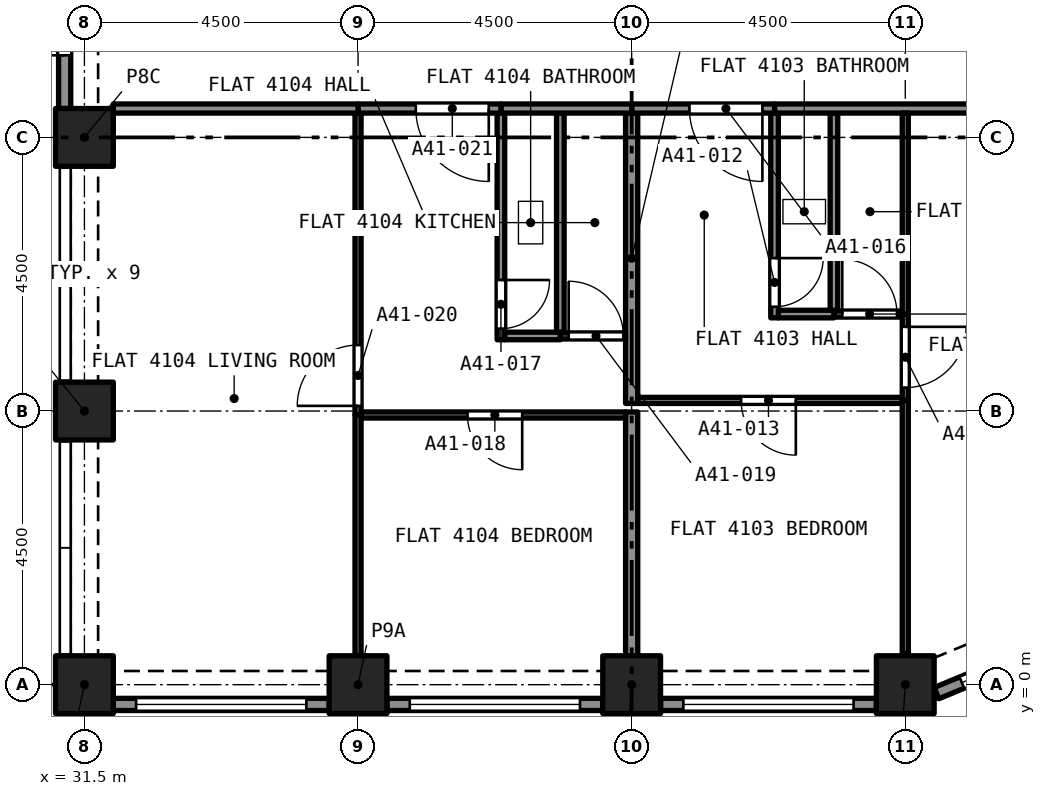
"""IFC4 building model, lengths in metres.
Left out: names, types, materials, properties, quantities, classifications, styles, units other than length and angle.
Written with IfcOpenShell. Run it as: python <this file> out.ifc"""

import sys

from ifc_helpers import new_model, si_unit, direction, frame, frame_2d, origin, origin_2d, place, context, subcontext, project, spatial, rectangle, extrude, element, fill, save


model = new_model("IFC4")
c1 = context("Model", 3, precision=1e-05, world=origin(), true_north=direction((0.0, 1.0)))
c2 = subcontext(c1, "Body", "Model", "MODEL_VIEW")
j1 = project(units=[si_unit("LENGTHUNIT", "METRE"), si_unit("PLANEANGLEUNIT", "RADIAN")], contexts=[c1])
p1 = place(None, origin())
s1 = spatial("IfcSite", under=j1, at=p1, CompositionType="ELEMENT")
p2 = place(p1, origin())
s2 = spatial("IfcBuilding", under=s1, at=p2, CompositionType="ELEMENT")
p3 = place(p2, frame((0.0, 0.0, 146.2)))
s3 = spatial("IfcBuildingStorey", under=s2, at=p3, CompositionType="ELEMENT", Elevation=146.2)
for number, where, z_axis, x_axis in (
    (1, (31.5, 0.0, 0.0), (0.0, 0.0, 1.0), (1.0, 0.0, 0.0)),
    (2, (36.0, 0.0, 0.0), (0.0, 0.0, 1.0), (1.0, 0.0, 0.0)),
    (3, (40.5, 0.0, 0.0), (0.0, 0.0, 1.0), (1.0, 0.0, 0.0)),
    (4, (45.0, 0.0, 0.0), (0.0, 0.0, 1.0), (1.0, 0.0, 0.0)),
    (5, (31.5, 4.5, 0.0), (0.0, 0.0, 1.0), (1.0, 0.0, 0.0)),
    (6, (31.5, 9.0, 0.0), (0.0, 0.0, 1.0), (1.0, 0.0, 0.0)),
):
    element("IfcColumn", number, at=place(p3, frame(where, z_axis=z_axis, x_axis=x_axis)), inside=s3, PredefinedType="COLUMN", context=c2, shape_type="SweptSolid", body=[
        extrude(rectangle(XDim=0.95, YDim=0.95, at=origin_2d()), origin(), (0.0, 0.0, 1.0), 4.4),
    ])
p4 = place(p3, frame((35.525, -0.325, 0.0), z_axis=(0.0, 0.0, 1.0), x_axis=(-1.0, 0.0, 0.0)))
e7 = element("IfcWall", 7, at=p4, inside=s3, PredefinedType="SOLIDWALL", context=c2, shape_type="SweptSolid", body=[
    extrude(rectangle(XDim=3.55, YDim=0.2, at=frame_2d((1.775, 0.0))), origin(), (0.0, 0.0, 1.0), 4.4),
])
p5 = place(p4, frame((0.375, 0.0, 0.45)))
e8 = element("IfcOpeningElement", 8, at=p5, cuts=e7, PredefinedType="OPENING", context=c2, shape_type="SweptSolid", body=[
    extrude(rectangle(XDim=2.8, YDim=2.55, at=frame_2d((1.4, 1.275))), frame((0.0, 0.11, 0.0), z_axis=(0.0, -1.0, 0.0), x_axis=(1.0, 0.0, 0.0)), (0.0, 0.0, 1.0), 0.22),
])
p6 = place(p3, frame((40.025, -0.325, 0.0), z_axis=(0.0, 0.0, 1.0), x_axis=(-1.0, 0.0, 0.0)))
e9 = element("IfcWall", 9, at=p6, inside=s3, PredefinedType="SOLIDWALL", context=c2, shape_type="SweptSolid", body=[
    extrude(rectangle(XDim=3.55, YDim=0.2, at=frame_2d((1.775, 0.0))), origin(), (0.0, 0.0, 1.0), 4.4),
])
p7 = place(p6, frame((0.375, 0.0, 0.45)))
e10 = element("IfcOpeningElement", 10, at=p7, cuts=e9, PredefinedType="OPENING", context=c2, shape_type="SweptSolid", body=[
    extrude(rectangle(XDim=2.8, YDim=2.55, at=frame_2d((1.4, 1.275))), frame((0.0, 0.11, 0.0), z_axis=(0.0, -1.0, 0.0), x_axis=(1.0, 0.0, 0.0)), (0.0, 0.0, 1.0), 0.22),
])
p8 = place(p3, frame((44.525, -0.325, 0.0), z_axis=(0.0, 0.0, 1.0), x_axis=(-1.0, 0.0, 0.0)))
e11 = element("IfcWall", 11, at=p8, inside=s3, PredefinedType="SOLIDWALL", context=c2, shape_type="SweptSolid", body=[
    extrude(rectangle(XDim=3.55, YDim=0.2, at=frame_2d((1.775, 0.0))), origin(), (0.0, 0.0, 1.0), 4.4),
])
p9 = place(p8, frame((0.375, 0.0, 0.45)))
e12 = element("IfcOpeningElement", 12, at=p9, cuts=e11, PredefinedType="OPENING", context=c2, shape_type="SweptSolid", body=[
    extrude(rectangle(XDim=2.8, YDim=2.55, at=frame_2d((1.4, 1.275))), frame((0.0, 0.11, 0.0), z_axis=(0.0, -1.0, 0.0), x_axis=(1.0, 0.0, 0.0)), (0.0, 0.0, 1.0), 0.22),
])
p10 = place(p3, frame((47.733, 0.78, 0.0), z_axis=(0.0, 0.0, 1.0), x_axis=(-0.923880599843, -0.382680855588, 0.0)))
e13 = element("IfcWall", 13, at=p10, inside=s3, PredefinedType="SOLIDWALL", context=c2, shape_type="SweptSolid", body=[
    extrude(rectangle(XDim=2.403, YDim=0.2, at=frame_2d((1.201, 0.0))), origin(), (0.0, 0.0, 1.0), 4.4),
])
p11 = place(p10, frame((0.251, 0.0, 0.45)))
e14 = element("IfcOpeningElement", 14, at=p11, cuts=e13, PredefinedType="OPENING", context=c2, shape_type="SweptSolid", body=[
    extrude(rectangle(XDim=1.7, YDim=2.55, at=frame_2d((0.85, 1.275))), frame((0.0, 0.11, 0.0), z_axis=(0.0, -1.0, 0.0), x_axis=(1.0, 0.0, 0.0)), (0.0, 0.0, 1.0), 0.22),
])
p12 = place(p3, frame((31.175, 9.475, 0.0), z_axis=(0.0, 0.0, 1.0), x_axis=(0.0, 1.0, 0.0)))
e15 = element("IfcWall", 15, at=p12, inside=s3, PredefinedType="SOLIDWALL", context=c2, shape_type="SweptSolid", body=[
    extrude(rectangle(XDim=3.55, YDim=0.2, at=frame_2d((1.775, 0.0))), origin(), (0.0, 0.0, 1.0), 4.4),
])
p13 = place(p12, frame((0.875, 0.0, 0.0)))
e16 = element("IfcOpeningElement", 16, at=p13, cuts=e15, PredefinedType="OPENING", context=c2, shape_type="SweptSolid", body=[
    extrude(rectangle(XDim=1.8, YDim=2.4, at=frame_2d((0.9, 1.2))), frame((0.0, 0.11, 0.0), z_axis=(0.0, -1.0, 0.0), x_axis=(1.0, 0.0, 0.0)), (0.0, 0.0, 1.0), 0.22),
])
p14 = place(p3, frame((42.913, 6.095, 0.0), z_axis=(0.0, 0.0, 1.0), x_axis=(1.0, 0.0, 0.0)))
e17 = element("IfcWall", 17, at=p14, inside=s3, PredefinedType="PARTITIONING", context=c2, shape_type="SweptSolid", body=[
    extrude(rectangle(XDim=0.915, YDim=0.125, at=frame_2d((0.458, 0.0))), origin(), (0.0, 0.0, 1.0), 4.1),
])
p15 = place(p3, frame((42.85, 9.4, 0.0), z_axis=(0.0, 0.0, 1.0), x_axis=(0.0, -1.0, 0.0)))
e18 = element("IfcWall", 18, at=p15, inside=s3, PredefinedType="PARTITIONING", context=c2, shape_type="SweptSolid", body=[
    extrude(rectangle(XDim=3.367, YDim=0.125, at=frame_2d((1.684, 0.0))), origin(), (0.0, 0.0, 1.0), 4.1),
])
p16 = place(p15, frame((2.385, 0.0, 0.0)))
e19 = element("IfcOpeningElement", 19, at=p16, cuts=e18, PredefinedType="OPENING", context=c2, shape_type="SweptSolid", body=[
    extrude(rectangle(XDim=0.8, YDim=2.1, at=frame_2d((0.4, 1.05))), frame((0.0, 0.073, 0.0), z_axis=(0.0, -1.0, 0.0), x_axis=(1.0, 0.0, 0.0)), (0.0, 0.0, 1.0), 0.145),
])
p17 = place(p3, frame((43.827, 6.157, 0.0), z_axis=(0.0, 0.0, 1.0), x_axis=(0.0, 1.0, 0.0)))
e20 = element("IfcWall", 20, at=p17, inside=s3, PredefinedType="PARTITIONING", context=c2, shape_type="SweptSolid", body=[
    extrude(rectangle(XDim=3.242, YDim=0.125, at=frame_2d((1.621, 0.0))), origin(), (0.0, 0.0, 1.0), 4.1),
])
p18 = place(p3, frame((42.85, 9.475, 0.0), z_axis=(0.0, 0.0, 1.0), x_axis=(1.0, 0.0, 0.0)))
e21 = element("IfcWall", 21, at=p18, inside=s3, PredefinedType="PARTITIONING", context=c2, shape_type="SweptSolid", body=[
    extrude(rectangle(XDim=6.175, YDim=0.15, at=frame_2d((3.087, 0.0))), origin(), (0.0, 0.0, 1.0), 4.1),
])
p19 = place(p3, frame((44.95, 4.675, 0.0), z_axis=(0.0, 0.0, 1.0), x_axis=(-1.0, 0.0, 0.0)))
e22 = element("IfcWall", 22, at=p19, inside=s3, PredefinedType="PARTITIONING", context=c2, shape_type="SweptSolid", body=[
    extrude(rectangle(XDim=4.35, YDim=0.1, at=frame_2d((2.175, 0.0))), origin(), (0.0, 0.0, 1.0), 4.1),
])
p20 = place(p19, frame((1.75, 0.0, 0.0)))
e23 = element("IfcOpeningElement", 23, at=p20, cuts=e22, PredefinedType="OPENING", context=c2, shape_type="SweptSolid", body=[
    extrude(rectangle(XDim=0.9, YDim=2.1, at=frame_2d((0.45, 1.05))), frame((0.0, 0.06, 0.0), z_axis=(0.0, -1.0, 0.0), x_axis=(1.0, 0.0, 0.0)), (0.0, 0.0, 1.0), 0.12),
])
p21 = place(p3, frame((45.0, 0.514, 0.0), z_axis=(0.0, 0.0, 1.0), x_axis=(0.0, 1.0, 0.0)))
e24 = element("IfcWall", 24, at=p21, inside=s3, PredefinedType="PARTITIONING", context=c2, shape_type="SweptSolid", body=[
    extrude(rectangle(XDim=4.161, YDim=0.1, at=frame_2d((2.081, 0.0))), origin(), (0.0, 0.0, 1.0), 4.1),
])
p22 = place(p3, frame((40.5, 0.475, 0.0), z_axis=(0.0, 0.0, 1.0), x_axis=(0.0, 1.0, 0.0)))
e25 = element("IfcWall", 25, at=p22, inside=s3, PredefinedType="PARTITIONING", context=c2, shape_type="SweptSolid", body=[
    extrude(rectangle(XDim=4.01, YDim=0.2, at=frame_2d((2.005, 0.0))), origin(), (0.0, 0.0, 1.0), 4.1),
])
p23 = place(p3, frame((43.827, 6.095, 0.0), z_axis=(0.0, 0.0, 1.0), x_axis=(1.0, 0.0, 0.0)))
e26 = element("IfcWall", 26, at=p23, inside=s3, PredefinedType="PARTITIONING", context=c2, shape_type="SweptSolid", body=[
    extrude(rectangle(XDim=1.123, YDim=0.1, at=frame_2d((0.561, 0.0))), origin(), (0.0, 0.0, 1.0), 4.1),
])
p24 = place(p23, frame((0.136, 0.0, 0.0)))
e27 = element("IfcOpeningElement", 27, at=p24, cuts=e26, PredefinedType="OPENING", context=c2, shape_type="SweptSolid", body=[
    extrude(rectangle(XDim=0.9, YDim=2.1, at=frame_2d((0.45, 1.05))), frame((0.0, 0.06, 0.0), z_axis=(0.0, -1.0, 0.0), x_axis=(1.0, 0.0, 0.0)), (0.0, 0.0, 1.0), 0.12),
])
p25 = place(p3, frame((45.0, 6.095, 0.0), z_axis=(0.0, 0.0, 1.0), x_axis=(0.0, -1.0, 0.0)))
e28 = element("IfcWall", 28, at=p25, inside=s3, PredefinedType="PARTITIONING", context=c2, shape_type="SweptSolid", body=[
    extrude(rectangle(XDim=1.42, YDim=0.1, at=frame_2d((0.71, 0.0))), origin(), (0.0, 0.0, 1.0), 4.1),
])
p26 = place(p25, frame((0.21, 0.0, 0.0)))
e29 = element("IfcOpeningElement", 29, at=p26, cuts=e28, PredefinedType="OPENING", context=c2, shape_type="SweptSolid", body=[
    extrude(rectangle(XDim=1.0, YDim=2.1, at=frame_2d((0.5, 1.05))), frame((0.0, 0.06, 0.0), z_axis=(0.0, -1.0, 0.0), x_axis=(1.0, 0.0, 0.0)), (0.0, 0.0, 1.0), 0.12),
])
p27 = place(p3, frame((40.5, 4.625, 0.0), z_axis=(0.0, 0.0, 1.0), x_axis=(0.0, 1.0, 0.0)))
e30 = element("IfcWall", 30, at=p27, inside=s3, PredefinedType="PARTITIONING", context=c2, shape_type="SweptSolid", body=[
    extrude(rectangle(XDim=4.775, YDim=0.2, at=frame_2d((2.387, 0.0))), origin(), (0.0, 0.0, 1.0), 4.1),
])
p28 = place(p3, frame((42.85, 9.475, 0.0), z_axis=(0.0, 0.0, 1.0), x_axis=(-1.0, 0.0, 0.0)))
e31 = element("IfcWall", 31, at=p28, inside=s3, PredefinedType="PARTITIONING", context=c2, shape_type="SweptSolid", body=[
    extrude(rectangle(XDim=2.35, YDim=0.15, at=frame_2d((1.175, 0.0))), origin(), (0.0, 0.0, 1.0), 4.1),
])
p29 = place(p28, frame((0.2, 0.0, 0.0)))
e32 = element("IfcOpeningElement", 32, at=p29, cuts=e31, PredefinedType="OPENING", context=c2, shape_type="SweptSolid", body=[
    extrude(rectangle(XDim=1.2, YDim=2.4, at=frame_2d((0.6, 1.2))), frame((0.0, 0.085, 0.0), z_axis=(0.0, -1.0, 0.0), x_axis=(1.0, 0.0, 0.0)), (0.0, 0.0, 1.0), 0.17),
])
p30 = place(p3, frame((45.0, 6.095, 0.0), z_axis=(0.0, 0.0, 1.0), x_axis=(0.0, 1.0, 0.0)))
e33 = element("IfcWall", 33, at=p30, inside=s3, PredefinedType="PARTITIONING", context=c2, shape_type="SweptSolid", body=[
    extrude(rectangle(XDim=3.305, YDim=0.1, at=frame_2d((1.652, 0.0))), origin(), (0.0, 0.0, 1.0), 4.1),
])
p31 = place(p3, frame((38.413, 5.735, 0.0), z_axis=(0.0, 0.0, 1.0), x_axis=(1.0, 0.0, 0.0)))
e34 = element("IfcWall", 34, at=p31, inside=s3, PredefinedType="PARTITIONING", context=c2, shape_type="SweptSolid", body=[
    extrude(rectangle(XDim=0.915, YDim=0.125, at=frame_2d((0.458, 0.0))), origin(), (0.0, 0.0, 1.0), 4.1),
])
p32 = place(p3, frame((38.35, 9.4, 0.0), z_axis=(0.0, 0.0, 1.0), x_axis=(0.0, -1.0, 0.0)))
e35 = element("IfcWall", 35, at=p32, inside=s3, PredefinedType="PARTITIONING", context=c2, shape_type="SweptSolid", body=[
    extrude(rectangle(XDim=3.727, YDim=0.125, at=frame_2d((1.864, 0.0))), origin(), (0.0, 0.0, 1.0), 4.1),
])
p33 = place(p32, frame((2.745, 0.0, 0.0)))
e36 = element("IfcOpeningElement", 36, at=p33, cuts=e35, PredefinedType="OPENING", context=c2, shape_type="SweptSolid", body=[
    extrude(rectangle(XDim=0.8, YDim=2.1, at=frame_2d((0.4, 1.05))), frame((0.0, 0.073, 0.0), z_axis=(0.0, -1.0, 0.0), x_axis=(1.0, 0.0, 0.0)), (0.0, 0.0, 1.0), 0.145),
])
p34 = place(p3, frame((39.327, 5.798, 0.0), z_axis=(0.0, 0.0, 1.0), x_axis=(0.0, 1.0, 0.0)))
e37 = element("IfcWall", 37, at=p34, inside=s3, PredefinedType="PARTITIONING", context=c2, shape_type="SweptSolid", body=[
    extrude(rectangle(XDim=3.602, YDim=0.125, at=frame_2d((1.801, 0.0))), origin(), (0.0, 0.0, 1.0), 4.1),
])
p35 = place(p3, frame((38.35, 9.475, 0.0), z_axis=(0.0, 0.0, 1.0), x_axis=(1.0, 0.0, 0.0)))
e38 = element("IfcWall", 38, at=p35, inside=s3, PredefinedType="PARTITIONING", context=c2, shape_type="SweptSolid", body=[
    extrude(rectangle(XDim=2.15, YDim=0.15, at=frame_2d((1.075, 0.0))), origin(), (0.0, 0.0, 1.0), 4.1),
])
p36 = place(p3, frame((40.4, 4.435, 0.0), z_axis=(0.0, 0.0, 1.0), x_axis=(-1.0, 0.0, 0.0)))
e39 = element("IfcWall", 39, at=p36, inside=s3, PredefinedType="PARTITIONING", context=c2, shape_type="SweptSolid", body=[
    extrude(rectangle(XDim=4.35, YDim=0.1, at=frame_2d((2.175, 0.0))), origin(), (0.0, 0.0, 1.0), 4.1),
])
p37 = place(p36, frame((1.7, 0.0, 0.0)))
e40 = element("IfcOpeningElement", 40, at=p37, cuts=e39, PredefinedType="OPENING", context=c2, shape_type="SweptSolid", body=[
    extrude(rectangle(XDim=0.9, YDim=2.1, at=frame_2d((0.45, 1.05))), frame((0.0, 0.06, 0.0), z_axis=(0.0, -1.0, 0.0), x_axis=(1.0, 0.0, 0.0)), (0.0, 0.0, 1.0), 0.12),
])
p38 = place(p3, frame((36.0, 0.475, 0.0), z_axis=(0.0, 0.0, 1.0), x_axis=(0.0, 1.0, 0.0)))
e41 = element("IfcWall", 41, at=p38, inside=s3, PredefinedType="PARTITIONING", context=c2, shape_type="SweptSolid", body=[
    extrude(rectangle(XDim=3.96, YDim=0.1, at=frame_2d((1.98, 0.0))), origin(), (0.0, 0.0, 1.0), 4.1),
])
p39 = place(p3, frame((39.327, 5.735, 0.0), z_axis=(0.0, 0.0, 1.0), x_axis=(1.0, 0.0, 0.0)))
e42 = element("IfcWall", 42, at=p39, inside=s3, PredefinedType="PARTITIONING", context=c2, shape_type="SweptSolid", body=[
    extrude(rectangle(XDim=1.073, YDim=0.1, at=frame_2d((0.536, 0.0))), origin(), (0.0, 0.0, 1.0), 4.1),
])
p40 = place(p39, frame((0.136, 0.0, 0.0)))
e43 = element("IfcOpeningElement", 43, at=p40, cuts=e42, PredefinedType="OPENING", context=c2, shape_type="SweptSolid", body=[
    extrude(rectangle(XDim=0.9, YDim=2.1, at=frame_2d((0.45, 1.05))), frame((0.0, 0.06, 0.0), z_axis=(0.0, -1.0, 0.0), x_axis=(1.0, 0.0, 0.0)), (0.0, 0.0, 1.0), 0.12),
])
p41 = place(p3, frame((36.0, 4.435, 0.0), z_axis=(0.0, 0.0, 1.0), x_axis=(0.0, 1.0, 0.0)))
e44 = element("IfcWall", 44, at=p41, inside=s3, PredefinedType="PARTITIONING", context=c2, shape_type="SweptSolid", body=[
    extrude(rectangle(XDim=4.965, YDim=0.1, at=frame_2d((2.482, 0.0))), origin(), (0.0, 0.0, 1.0), 4.1),
])
p42 = place(p41, frame((0.15, 0.0, 0.0)))
e45 = element("IfcOpeningElement", 45, at=p42, cuts=e44, PredefinedType="OPENING", context=c2, shape_type="SweptSolid", body=[
    extrude(rectangle(XDim=1.0, YDim=2.1, at=frame_2d((0.5, 1.05))), frame((0.0, 0.06, 0.0), z_axis=(0.0, -1.0, 0.0), x_axis=(1.0, 0.0, 0.0)), (0.0, 0.0, 1.0), 0.12),
])
p43 = place(p3, frame((38.35, 9.475, 0.0), z_axis=(0.0, 0.0, 1.0), x_axis=(-1.0, 0.0, 0.0)))
e46 = element("IfcWall", 46, at=p43, inside=s3, PredefinedType="PARTITIONING", context=c2, shape_type="SweptSolid", body=[
    extrude(rectangle(XDim=2.35, YDim=0.15, at=frame_2d((1.175, 0.0))), origin(), (0.0, 0.0, 1.0), 4.1),
])
p44 = place(p43, frame((0.2, 0.0, 0.0)))
e47 = element("IfcOpeningElement", 47, at=p44, cuts=e46, PredefinedType="OPENING", context=c2, shape_type="SweptSolid", body=[
    extrude(rectangle(XDim=1.2, YDim=2.4, at=frame_2d((0.6, 1.2))), frame((0.0, 0.085, 0.0), z_axis=(0.0, -1.0, 0.0), x_axis=(1.0, 0.0, 0.0)), (0.0, 0.0, 1.0), 0.17),
])
p45 = place(p3, frame((31.975, 9.475, 0.0), z_axis=(0.0, 0.0, 1.0), x_axis=(1.0, 0.0, 0.0)))
e48 = element("IfcWall", 48, at=p45, inside=s3, PredefinedType="PARTITIONING", context=c2, shape_type="SweptSolid", body=[
    extrude(rectangle(XDim=4.025, YDim=0.15, at=frame_2d((2.012, 0.0))), origin(), (0.0, 0.0, 1.0), 4.1),
])
p46 = place(p5, origin())
e49 = element("IfcWindow", 49, at=p46, inside=s3, PartitioningType="SINGLE_PANEL", PredefinedType="WINDOW", context=c2, shape_type="SweptSolid", body=[
    extrude(rectangle(XDim=2.8, YDim=2.55, at=frame_2d((1.4, 1.275))), frame((0.0, 0.03, 0.0), z_axis=(0.0, -1.0, 0.0), x_axis=(1.0, 0.0, 0.0)), (0.0, 0.0, 1.0), 0.06),
])
fill(e8, e49)
p47 = place(p7, origin())
e50 = element("IfcWindow", 50, at=p47, inside=s3, PartitioningType="SINGLE_PANEL", PredefinedType="WINDOW", context=c2, shape_type="SweptSolid", body=[
    extrude(rectangle(XDim=2.8, YDim=2.55, at=frame_2d((1.4, 1.275))), frame((0.0, 0.03, 0.0), z_axis=(0.0, -1.0, 0.0), x_axis=(1.0, 0.0, 0.0)), (0.0, 0.0, 1.0), 0.06),
])
fill(e10, e50)
p48 = place(p9, origin())
e51 = element("IfcWindow", 51, at=p48, inside=s3, PartitioningType="SINGLE_PANEL", PredefinedType="WINDOW", context=c2, shape_type="SweptSolid", body=[
    extrude(rectangle(XDim=2.8, YDim=2.55, at=frame_2d((1.4, 1.275))), frame((0.0, 0.03, 0.0), z_axis=(0.0, -1.0, 0.0), x_axis=(1.0, 0.0, 0.0)), (0.0, 0.0, 1.0), 0.06),
])
fill(e12, e51)
p49 = place(p11, origin())
e52 = element("IfcWindow", 52, at=p49, inside=s3, PartitioningType="SINGLE_PANEL", PredefinedType="WINDOW", context=c2, shape_type="SweptSolid", body=[
    extrude(rectangle(XDim=1.7, YDim=2.55, at=frame_2d((0.85, 1.275))), frame((0.0, 0.03, 0.0), z_axis=(0.0, -1.0, 0.0), x_axis=(1.0, 0.0, 0.0)), (0.0, 0.0, 1.0), 0.06),
])
fill(e14, e52)
p50 = place(p13, origin())
e53 = element("IfcDoor", 53, at=p50, inside=s3, OperationType="DOUBLE_DOOR_SINGLE_SWING", PredefinedType="DOOR", context=c2, shape_type="SweptSolid", body=[
    extrude(rectangle(XDim=1.8, YDim=2.4, at=frame_2d((0.9, 1.2))), frame((0.0, 0.025, 0.0), z_axis=(0.0, -1.0, 0.0), x_axis=(1.0, 0.0, 0.0)), (0.0, 0.0, 1.0), 0.05),
])
fill(e16, e53)
p51 = place(p16, origin())
e54 = element("IfcDoor", 54, at=p51, inside=s3, OperationType="SINGLE_SWING_RIGHT", PredefinedType="DOOR", context=c2, shape_type="SweptSolid", body=[
    extrude(rectangle(XDim=0.8, YDim=2.1, at=frame_2d((0.4, 1.05))), frame((0.0, 0.025, 0.0), z_axis=(0.0, -1.0, 0.0), x_axis=(1.0, 0.0, 0.0)), (0.0, 0.0, 1.0), 0.05),
])
fill(e19, e54)
p52 = place(p20, origin())
e55 = element("IfcDoor", 55, at=p52, inside=s3, OperationType="SINGLE_SWING_RIGHT", PredefinedType="DOOR", context=c2, shape_type="SweptSolid", body=[
    extrude(rectangle(XDim=0.9, YDim=2.1, at=frame_2d((0.45, 1.05))), frame((0.0, 0.025, 0.0), z_axis=(0.0, -1.0, 0.0), x_axis=(1.0, 0.0, 0.0)), (0.0, 0.0, 1.0), 0.05),
])
fill(e23, e55)
p53 = place(p24, origin())
e56 = element("IfcDoor", 56, at=p53, inside=s3, OperationType="SINGLE_SWING_RIGHT", PredefinedType="DOOR", context=c2, shape_type="SweptSolid", body=[
    extrude(rectangle(XDim=0.9, YDim=2.1, at=frame_2d((0.45, 1.05))), frame((0.0, 0.025, 0.0), z_axis=(0.0, -1.0, 0.0), x_axis=(1.0, 0.0, 0.0)), (0.0, 0.0, 1.0), 0.05),
])
fill(e27, e56)
p54 = place(p26, origin())
e57 = element("IfcDoor", 57, at=p54, inside=s3, OperationType="SINGLE_SWING_RIGHT", PredefinedType="DOOR", context=c2, shape_type="SweptSolid", body=[
    extrude(rectangle(XDim=1.0, YDim=2.1, at=frame_2d((0.5, 1.05))), frame((0.0, 0.025, 0.0), z_axis=(0.0, -1.0, 0.0), x_axis=(1.0, 0.0, 0.0)), (0.0, 0.0, 1.0), 0.05),
])
fill(e29, e57)
p55 = place(p29, origin())
e58 = element("IfcDoor", 58, at=p55, inside=s3, OperationType="SINGLE_SWING_LEFT", PredefinedType="DOOR", context=c2, shape_type="SweptSolid", body=[
    extrude(rectangle(XDim=1.2, YDim=2.4, at=frame_2d((0.6, 1.2))), frame((0.0, 0.025, 0.0), z_axis=(0.0, -1.0, 0.0), x_axis=(1.0, 0.0, 0.0)), (0.0, 0.0, 1.0), 0.05),
])
fill(e32, e58)
p56 = place(p33, origin())
e59 = element("IfcDoor", 59, at=p56, inside=s3, OperationType="SINGLE_SWING_RIGHT", PredefinedType="DOOR", context=c2, shape_type="SweptSolid", body=[
    extrude(rectangle(XDim=0.8, YDim=2.1, at=frame_2d((0.4, 1.05))), frame((0.0, 0.025, 0.0), z_axis=(0.0, -1.0, 0.0), x_axis=(1.0, 0.0, 0.0)), (0.0, 0.0, 1.0), 0.05),
])
fill(e36, e59)
p57 = place(p37, origin())
e60 = element("IfcDoor", 60, at=p57, inside=s3, OperationType="SINGLE_SWING_LEFT", PredefinedType="DOOR", context=c2, shape_type="SweptSolid", body=[
    extrude(rectangle(XDim=0.9, YDim=2.1, at=frame_2d((0.45, 1.05))), frame((0.0, 0.025, 0.0), z_axis=(0.0, -1.0, 0.0), x_axis=(1.0, 0.0, 0.0)), (0.0, 0.0, 1.0), 0.05),
])
fill(e40, e60)
p58 = place(p40, origin())
e61 = element("IfcDoor", 61, at=p58, inside=s3, OperationType="SINGLE_SWING_RIGHT", PredefinedType="DOOR", context=c2, shape_type="SweptSolid", body=[
    extrude(rectangle(XDim=0.9, YDim=2.1, at=frame_2d((0.45, 1.05))), frame((0.0, 0.025, 0.0), z_axis=(0.0, -1.0, 0.0), x_axis=(1.0, 0.0, 0.0)), (0.0, 0.0, 1.0), 0.05),
])
fill(e43, e61)
p59 = place(p42, origin())
e62 = element("IfcDoor", 62, at=p59, inside=s3, OperationType="SINGLE_SWING_LEFT", PredefinedType="DOOR", context=c2, shape_type="SweptSolid", body=[
    extrude(rectangle(XDim=1.0, YDim=2.1, at=frame_2d((0.5, 1.05))), frame((0.0, 0.025, 0.0), z_axis=(0.0, -1.0, 0.0), x_axis=(1.0, 0.0, 0.0)), (0.0, 0.0, 1.0), 0.05),
])
fill(e45, e62)
p60 = place(p44, origin())
e63 = element("IfcDoor", 63, at=p60, inside=s3, OperationType="SINGLE_SWING_LEFT", PredefinedType="DOOR", context=c2, shape_type="SweptSolid", body=[
    extrude(rectangle(XDim=1.2, YDim=2.4, at=frame_2d((0.6, 1.2))), frame((0.0, 0.025, 0.0), z_axis=(0.0, -1.0, 0.0), x_axis=(1.0, 0.0, 0.0)), (0.0, 0.0, 1.0), 0.05),
])
fill(e47, e63)
save(model, sys.argv[1])
